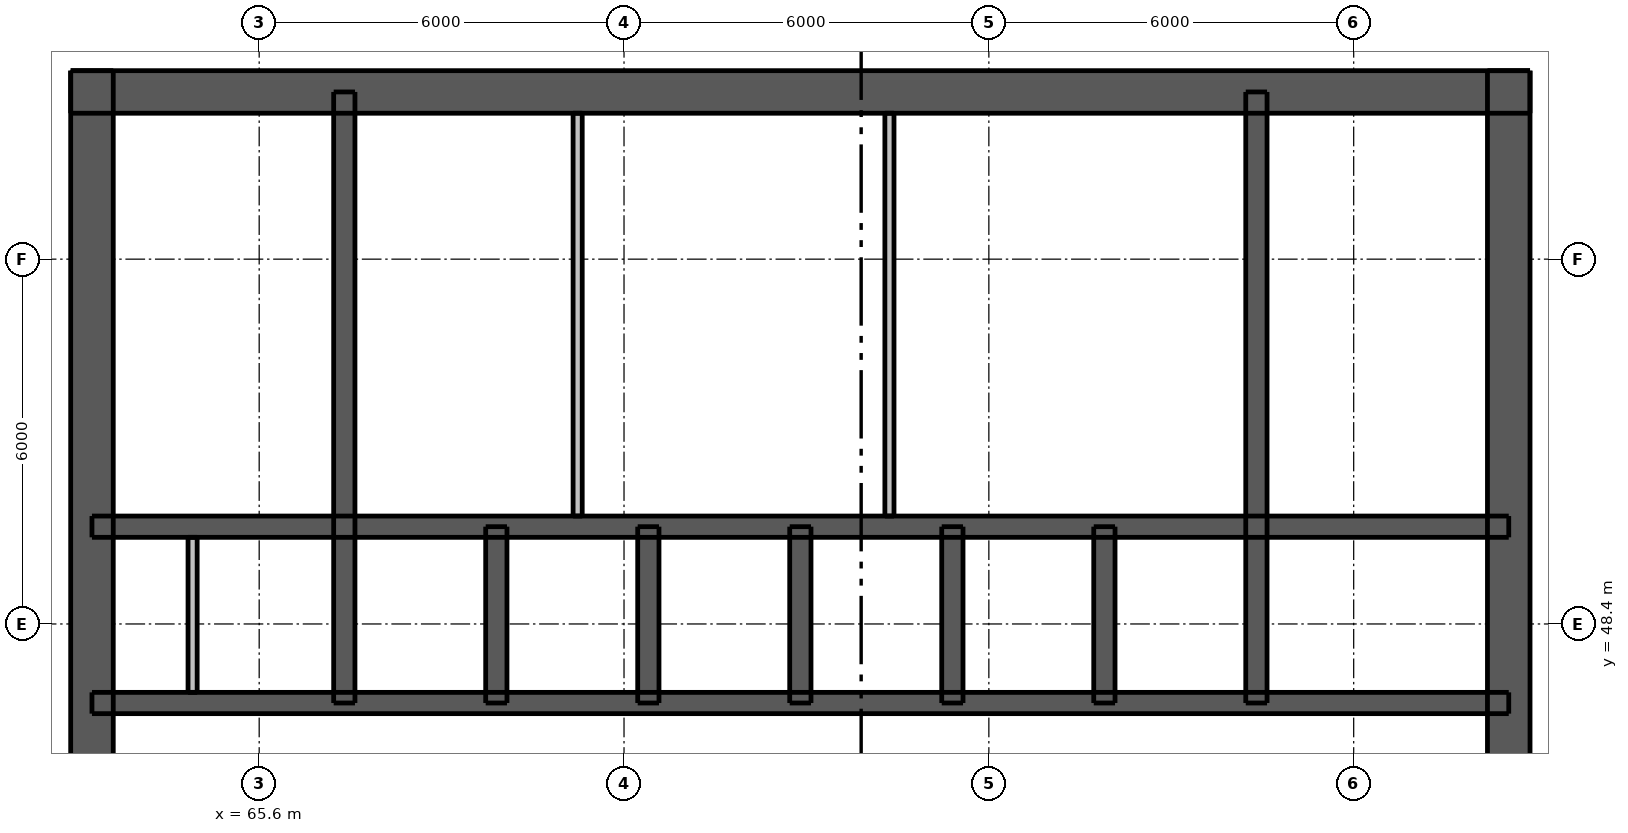
"""IFC4 building model, lengths in metres.
Left out: names, types, materials, properties, quantities, classifications, styles, units other than length and angle.
Written with IfcOpenShell. Run it as: python <this file> out.ifc"""

import sys

from ifc_helpers import new_model, si_unit, direction, frame, frame_2d, origin, place, context, subcontext, project, spatial, rectangle, extrude, element, fill, save


model = new_model("IFC4")
c1 = context("Model", 3, precision=1e-05, world=origin(), true_north=direction((0.0, 1.0)))
c2 = subcontext(c1, "Body", "Model", "MODEL_VIEW")
j1 = project(units=[si_unit("LENGTHUNIT", "METRE"), si_unit("PLANEANGLEUNIT", "RADIAN")], contexts=[c1])
p1 = place(None, origin())
s1 = spatial("IfcSite", under=j1, at=p1, CompositionType="ELEMENT")
p2 = place(p1, origin())
s2 = spatial("IfcBuilding", under=s1, at=p2, CompositionType="ELEMENT")
p3 = place(p2, frame((0.0, 0.0, 150.4)))
s3 = spatial("IfcBuildingStorey", under=s2, at=p3, CompositionType="ELEMENT", Elevation=150.4)
p4 = place(p3, frame((62.5, 57.15, 0.0), z_axis=(0.0, 0.0, 1.0), x_axis=(1.0, 0.0, 0.0)))
e1 = element("IfcWall", 1, at=p4, inside=s3, PredefinedType="SHEAR", context=c2, shape_type="SweptSolid", body=[
    extrude(rectangle(XDim=24.0, YDim=0.7, at=frame_2d((12.0, 0.0))), origin(), (0.0, 0.0, 1.0), 4.25),
])
p5 = place(p4, frame((20.938, 0.0, 0.0)))
e2 = element("IfcOpeningElement", 2, at=p5, cuts=e1, PredefinedType="OPENING", context=c2, shape_type="SweptSolid", body=[
    extrude(rectangle(XDim=1.1, YDim=2.1, at=frame_2d((0.55, 1.05))), frame((0.0, 0.36, 0.0), z_axis=(0.0, -1.0, 0.0), x_axis=(1.0, 0.0, 0.0)), (0.0, 0.0, 1.0), 0.72),
])
p6 = place(p4, frame((1.962, 0.0, 0.0)))
e3 = element("IfcOpeningElement", 3, at=p6, cuts=e1, PredefinedType="OPENING", context=c2, shape_type="SweptSolid", body=[
    extrude(rectangle(XDim=1.1, YDim=2.1, at=frame_2d((0.55, 1.05))), frame((0.0, 0.36, 0.0), z_axis=(0.0, -1.0, 0.0), x_axis=(1.0, 0.0, 0.0)), (0.0, 0.0, 1.0), 0.72),
])
p7 = place(p4, frame((6.056, 0.0, 0.0)))
e4 = element("IfcOpeningElement", 4, at=p7, cuts=e1, PredefinedType="OPENING", context=c2, shape_type="SweptSolid", body=[
    extrude(rectangle(XDim=0.9, YDim=2.1, at=frame_2d((0.45, 1.05))), frame((0.0, 0.36, 0.0), z_axis=(0.0, -1.0, 0.0), x_axis=(1.0, 0.0, 0.0)), (0.0, 0.0, 1.0), 0.72),
])
p8 = place(p4, frame((10.451, 0.0, 0.0)))
e5 = element("IfcOpeningElement", 5, at=p8, cuts=e1, PredefinedType="OPENING", context=c2, shape_type="SweptSolid", body=[
    extrude(rectangle(XDim=0.9, YDim=2.1, at=frame_2d((0.45, 1.05))), frame((0.0, 0.36, 0.0), z_axis=(0.0, -1.0, 0.0), x_axis=(1.0, 0.0, 0.0)), (0.0, 0.0, 1.0), 0.72),
])
p9 = place(p4, frame((15.945, 0.0, 0.0)))
e6 = element("IfcOpeningElement", 6, at=p9, cuts=e1, PredefinedType="OPENING", context=c2, shape_type="SweptSolid", body=[
    extrude(rectangle(XDim=0.9, YDim=2.1, at=frame_2d((0.45, 1.05))), frame((0.0, 0.36, 0.0), z_axis=(0.0, -1.0, 0.0), x_axis=(1.0, 0.0, 0.0)), (0.0, 0.0, 1.0), 0.72),
])
p10 = place(p3, frame((62.85, 33.5, 0.0), z_axis=(0.0, 0.0, 1.0), x_axis=(0.0, 1.0, 0.0)))
e7 = element("IfcWall", 7, at=p10, inside=s3, PredefinedType="SHEAR", context=c2, shape_type="SweptSolid", body=[
    extrude(rectangle(XDim=24.0, YDim=0.7, at=frame_2d((12.0, 0.0))), origin(), (0.0, 0.0, 1.0), 4.25),
])
p11 = place(p10, frame((11.2, 0.0, 0.0)))
e8 = element("IfcOpeningElement", 8, at=p11, cuts=e7, PredefinedType="OPENING", context=c2, shape_type="SweptSolid", body=[
    extrude(rectangle(XDim=1.6, YDim=2.1, at=frame_2d((0.8, 1.05))), frame((0.0, 0.36, 0.0), z_axis=(0.0, -1.0, 0.0), x_axis=(1.0, 0.0, 0.0)), (0.0, 0.0, 1.0), 0.72),
])
p12 = place(p3, frame((86.15, 33.5, 0.0), z_axis=(0.0, 0.0, 1.0), x_axis=(0.0, 1.0, 0.0)))
e9 = element("IfcWall", 9, at=p12, inside=s3, PredefinedType="SHEAR", context=c2, shape_type="SweptSolid", body=[
    extrude(rectangle(XDim=24.0, YDim=0.7, at=frame_2d((12.0, 0.0))), origin(), (0.0, 0.0, 1.0), 4.25),
])
p13 = place(p12, frame((11.2, 0.0, 0.0)))
e10 = element("IfcOpeningElement", 10, at=p13, cuts=e9, PredefinedType="OPENING", context=c2, shape_type="SweptSolid", body=[
    extrude(rectangle(XDim=1.6, YDim=2.1, at=frame_2d((0.8, 1.05))), frame((0.0, 0.36, 0.0), z_axis=(0.0, -1.0, 0.0), x_axis=(1.0, 0.0, 0.0)), (0.0, 0.0, 1.0), 0.72),
])
p14 = place(p3, frame((62.85, 47.1, 0.0), z_axis=(0.0, 0.0, 1.0), x_axis=(1.0, 0.0, 0.0)))
e11 = element("IfcWall", 11, at=p14, inside=s3, PredefinedType="SHEAR", context=c2, shape_type="SweptSolid", body=[
    extrude(rectangle(XDim=23.3, YDim=0.35, at=frame_2d((11.65, 0.0))), origin(), (0.0, 0.0, 1.0), 4.25),
])
p15 = place(p14, frame((0.603, 0.0, 0.0)))
e12 = element("IfcOpeningElement", 12, at=p15, cuts=e11, PredefinedType="OPENING", context=c2, shape_type="SweptSolid", body=[
    extrude(rectangle(XDim=0.8, YDim=2.1, at=frame_2d((0.4, 1.05))), frame((0.0, 0.185, 0.0), z_axis=(0.0, -1.0, 0.0), x_axis=(1.0, 0.0, 0.0)), (0.0, 0.0, 1.0), 0.37),
])
p16 = place(p14, frame((2.365, 0.0, 0.0)))
e13 = element("IfcOpeningElement", 13, at=p16, cuts=e11, PredefinedType="OPENING", context=c2, shape_type="SweptSolid", body=[
    extrude(rectangle(XDim=0.9, YDim=2.1, at=frame_2d((0.45, 1.05))), frame((0.0, 0.185, 0.0), z_axis=(0.0, -1.0, 0.0), x_axis=(1.0, 0.0, 0.0)), (0.0, 0.0, 1.0), 0.37),
])
p17 = place(p14, frame((20.688, 0.0, 0.0)))
e14 = element("IfcOpeningElement", 14, at=p17, cuts=e11, PredefinedType="OPENING", context=c2, shape_type="SweptSolid", body=[
    extrude(rectangle(XDim=0.9, YDim=2.1, at=frame_2d((0.45, 1.05))), frame((0.0, 0.185, 0.0), z_axis=(0.0, -1.0, 0.0), x_axis=(1.0, 0.0, 0.0)), (0.0, 0.0, 1.0), 0.37),
])
p18 = place(p14, frame((4.85, 0.0, 0.0)))
e15 = element("IfcOpeningElement", 15, at=p18, cuts=e11, PredefinedType="OPENING", context=c2, shape_type="SweptSolid", body=[
    extrude(rectangle(XDim=1.1, YDim=2.1, at=frame_2d((0.55, 1.05))), frame((0.0, 0.185, 0.0), z_axis=(0.0, -1.0, 0.0), x_axis=(1.0, 0.0, 0.0)), (0.0, 0.0, 1.0), 0.37),
])
p19 = place(p14, frame((7.35, 0.0, 0.0)))
e16 = element("IfcOpeningElement", 16, at=p19, cuts=e11, PredefinedType="OPENING", context=c2, shape_type="SweptSolid", body=[
    extrude(rectangle(XDim=1.1, YDim=2.1, at=frame_2d((0.55, 1.05))), frame((0.0, 0.185, 0.0), z_axis=(0.0, -1.0, 0.0), x_axis=(1.0, 0.0, 0.0)), (0.0, 0.0, 1.0), 0.37),
])
p20 = place(p14, frame((9.85, 0.0, 0.0)))
e17 = element("IfcOpeningElement", 17, at=p20, cuts=e11, PredefinedType="OPENING", context=c2, shape_type="SweptSolid", body=[
    extrude(rectangle(XDim=1.1, YDim=2.1, at=frame_2d((0.55, 1.05))), frame((0.0, 0.185, 0.0), z_axis=(0.0, -1.0, 0.0), x_axis=(1.0, 0.0, 0.0)), (0.0, 0.0, 1.0), 0.37),
])
p21 = place(p14, frame((12.35, 0.0, 0.0)))
e18 = element("IfcOpeningElement", 18, at=p21, cuts=e11, PredefinedType="OPENING", context=c2, shape_type="SweptSolid", body=[
    extrude(rectangle(XDim=1.1, YDim=2.1, at=frame_2d((0.55, 1.05))), frame((0.0, 0.185, 0.0), z_axis=(0.0, -1.0, 0.0), x_axis=(1.0, 0.0, 0.0)), (0.0, 0.0, 1.0), 0.37),
])
p22 = place(p14, frame((14.85, 0.0, 0.0)))
e19 = element("IfcOpeningElement", 19, at=p22, cuts=e11, PredefinedType="OPENING", context=c2, shape_type="SweptSolid", body=[
    extrude(rectangle(XDim=1.1, YDim=2.1, at=frame_2d((0.55, 1.05))), frame((0.0, 0.185, 0.0), z_axis=(0.0, -1.0, 0.0), x_axis=(1.0, 0.0, 0.0)), (0.0, 0.0, 1.0), 0.37),
])
p23 = place(p14, frame((17.35, 0.0, 0.0)))
e20 = element("IfcOpeningElement", 20, at=p23, cuts=e11, PredefinedType="OPENING", context=c2, shape_type="SweptSolid", body=[
    extrude(rectangle(XDim=1.1, YDim=2.1, at=frame_2d((0.55, 1.05))), frame((0.0, 0.185, 0.0), z_axis=(0.0, -1.0, 0.0), x_axis=(1.0, 0.0, 0.0)), (0.0, 0.0, 1.0), 0.37),
])
p24 = place(p3, frame((62.85, 50.0, 0.0), z_axis=(0.0, 0.0, 1.0), x_axis=(1.0, 0.0, 0.0)))
e21 = element("IfcWall", 21, at=p24, inside=s3, PredefinedType="SHEAR", context=c2, shape_type="SweptSolid", body=[
    extrude(rectangle(XDim=23.3, YDim=0.35, at=frame_2d((11.65, 0.0))), origin(), (0.0, 0.0, 1.0), 4.25),
])
for number, where, z_axis, x_axis in (
    (22, (67.0, 47.1, 0.0), (0.0, 0.0, 1.0), (0.0, 1.0, 0.0)),
    (23, (82.0, 47.1, 0.0), (0.0, 0.0, 1.0), (0.0, 1.0, 0.0)),
):
    element("IfcWall", number, at=place(p3, frame(where, z_axis=z_axis, x_axis=x_axis)), inside=s3, PredefinedType="SHEAR", context=c2, shape_type="SweptSolid", body=[
        extrude(rectangle(XDim=10.05, YDim=0.35, at=frame_2d((5.025, 0.0))), origin(), (0.0, 0.0, 1.0), 4.25),
    ])
for number, where, z_axis, x_axis in (
    (24, (69.5, 47.1, 0.0), (0.0, 0.0, 1.0), (0.0, 1.0, 0.0)),
    (25, (72.0, 47.1, 0.0), (0.0, 0.0, 1.0), (0.0, 1.0, 0.0)),
    (26, (74.5, 47.1, 0.0), (0.0, 0.0, 1.0), (0.0, 1.0, 0.0)),
    (27, (77.0, 47.1, 0.0), (0.0, 0.0, 1.0), (0.0, 1.0, 0.0)),
    (28, (79.5, 47.1, 0.0), (0.0, 0.0, 1.0), (0.0, 1.0, 0.0)),
):
    element("IfcWall", number, at=place(p3, frame(where, z_axis=z_axis, x_axis=x_axis)), inside=s3, PredefinedType="SHEAR", context=c2, shape_type="SweptSolid", body=[
        extrude(rectangle(XDim=2.9, YDim=0.35, at=frame_2d((1.45, 0.0))), origin(), (0.0, 0.0, 1.0), 4.25),
    ])
p25 = place(p3, frame((64.505, 47.275, 0.0), z_axis=(0.0, 0.0, 1.0), x_axis=(0.0, 1.0, 0.0)))
e29 = element("IfcWall", 29, at=p25, inside=s3, PredefinedType="PLUMBINGWALL", context=c2, shape_type="SweptSolid", body=[
    extrude(rectangle(XDim=2.55, YDim=0.15, at=frame_2d((1.275, 0.0))), origin(), (0.0, 0.0, 1.0), 4.25),
])
for number, where, z_axis, x_axis in (
    (30, (70.837, 50.175, 0.0), (0.0, 0.0, 1.0), (0.0, 1.0, 0.0)),
    (31, (75.965, 50.175, 0.0), (0.0, 0.0, 1.0), (0.0, 1.0, 0.0)),
):
    element("IfcWall", number, at=place(p3, frame(where, z_axis=z_axis, x_axis=x_axis)), inside=s3, PredefinedType="PLUMBINGWALL", context=c2, shape_type="SweptSolid", body=[
        extrude(rectangle(XDim=6.625, YDim=0.15, at=frame_2d((3.312, 0.0))), origin(), (0.0, 0.0, 1.0), 4.25),
    ])
p26 = place(p5, origin())
e32 = element("IfcDoor", 32, at=p26, inside=s3, OperationType="SINGLE_SWING_RIGHT", PredefinedType="DOOR", context=c2, shape_type="SweptSolid", body=[
    extrude(rectangle(XDim=1.1, YDim=2.1, at=frame_2d((0.55, 1.05))), frame((0.0, -0.288, 0.0), z_axis=(0.0, -1.0, 0.0), x_axis=(1.0, 0.0, 0.0)), (0.0, 0.0, 1.0), 0.05),
])
fill(e2, e32)
p27 = place(p6, origin())
e33 = element("IfcDoor", 33, at=p27, inside=s3, OperationType="SINGLE_SWING_LEFT", PredefinedType="DOOR", context=c2, shape_type="SweptSolid", body=[
    extrude(rectangle(XDim=1.1, YDim=2.1, at=frame_2d((0.55, 1.05))), frame((0.0, -0.288, 0.0), z_axis=(0.0, -1.0, 0.0), x_axis=(1.0, 0.0, 0.0)), (0.0, 0.0, 1.0), 0.05),
])
fill(e3, e33)
p28 = place(p11, origin())
e34 = element("IfcDoor", 34, at=p28, inside=s3, OperationType="DOUBLE_DOOR_SINGLE_SWING", PredefinedType="DOOR", context=c2, shape_type="SweptSolid", body=[
    extrude(rectangle(XDim=1.6, YDim=2.1, at=frame_2d((0.8, 1.05))), frame((0.0, -0.288, 0.0), z_axis=(0.0, -1.0, 0.0), x_axis=(1.0, 0.0, 0.0)), (0.0, 0.0, 1.0), 0.05),
])
fill(e8, e34)
p29 = place(p13, origin())
e35 = element("IfcDoor", 35, at=p29, inside=s3, OperationType="DOUBLE_DOOR_SINGLE_SWING", PredefinedType="DOOR", context=c2, shape_type="SweptSolid", body=[
    extrude(rectangle(XDim=1.6, YDim=2.1, at=frame_2d((0.8, 1.05))), frame((0.0, 0.337, 0.0), z_axis=(0.0, -1.0, 0.0), x_axis=(1.0, 0.0, 0.0)), (0.0, 0.0, 1.0), 0.05),
])
fill(e10, e35)
p30 = place(p15, origin())
e36 = element("IfcDoor", 36, at=p30, inside=s3, OperationType="SINGLE_SWING_LEFT", PredefinedType="DOOR", context=c2, shape_type="SweptSolid", body=[
    extrude(rectangle(XDim=0.8, YDim=2.1, at=frame_2d((0.4, 1.05))), frame((0.0, 0.163, 0.0), z_axis=(0.0, -1.0, 0.0), x_axis=(1.0, 0.0, 0.0)), (0.0, 0.0, 1.0), 0.05),
])
fill(e12, e36)
p31 = place(p16, origin())
e37 = element("IfcDoor", 37, at=p31, inside=s3, OperationType="SINGLE_SWING_RIGHT", PredefinedType="DOOR", context=c2, shape_type="SweptSolid", body=[
    extrude(rectangle(XDim=0.9, YDim=2.1, at=frame_2d((0.45, 1.05))), frame((0.0, 0.163, 0.0), z_axis=(0.0, -1.0, 0.0), x_axis=(1.0, 0.0, 0.0)), (0.0, 0.0, 1.0), 0.05),
])
fill(e13, e37)
p32 = place(p17, origin())
e38 = element("IfcDoor", 38, at=p32, inside=s3, OperationType="SINGLE_SWING_LEFT", PredefinedType="DOOR", context=c2, shape_type="SweptSolid", body=[
    extrude(rectangle(XDim=0.9, YDim=2.1, at=frame_2d((0.45, 1.05))), frame((0.0, 0.163, 0.0), z_axis=(0.0, -1.0, 0.0), x_axis=(1.0, 0.0, 0.0)), (0.0, 0.0, 1.0), 0.05),
])
fill(e14, e38)
p33 = place(p7, origin())
e39 = element("IfcDoor", 39, at=p33, inside=s3, OperationType="SINGLE_SWING_RIGHT", PredefinedType="DOOR", context=c2, shape_type="SweptSolid", body=[
    extrude(rectangle(XDim=0.9, YDim=2.1, at=frame_2d((0.45, 1.05))), frame((0.0, -0.288, 0.0), z_axis=(0.0, -1.0, 0.0), x_axis=(1.0, 0.0, 0.0)), (0.0, 0.0, 1.0), 0.05),
])
fill(e4, e39)
p34 = place(p8, origin())
e40 = element("IfcDoor", 40, at=p34, inside=s3, OperationType="SINGLE_SWING_RIGHT", PredefinedType="DOOR", context=c2, shape_type="SweptSolid", body=[
    extrude(rectangle(XDim=0.9, YDim=2.1, at=frame_2d((0.45, 1.05))), frame((0.0, -0.288, 0.0), z_axis=(0.0, -1.0, 0.0), x_axis=(1.0, 0.0, 0.0)), (0.0, 0.0, 1.0), 0.05),
])
fill(e5, e40)
p35 = place(p9, origin())
e41 = element("IfcDoor", 41, at=p35, inside=s3, OperationType="SINGLE_SWING_RIGHT", PredefinedType="DOOR", context=c2, shape_type="SweptSolid", body=[
    extrude(rectangle(XDim=0.9, YDim=2.1, at=frame_2d((0.45, 1.05))), frame((0.0, -0.288, 0.0), z_axis=(0.0, -1.0, 0.0), x_axis=(1.0, 0.0, 0.0)), (0.0, 0.0, 1.0), 0.05),
])
fill(e6, e41)
p36 = place(p18, origin())
e42 = element("IfcDoor", 42, at=p36, inside=s3, OperationType="DOUBLE_DOOR_SLIDING", PredefinedType="DOOR", context=c2, shape_type="SweptSolid", body=[
    extrude(rectangle(XDim=1.1, YDim=2.1, at=frame_2d((0.55, 1.05))), frame((0.0, 0.025, 0.0), z_axis=(0.0, -1.0, 0.0), x_axis=(1.0, 0.0, 0.0)), (0.0, 0.0, 1.0), 0.05),
])
fill(e15, e42)
p37 = place(p19, origin())
e43 = element("IfcDoor", 43, at=p37, inside=s3, OperationType="DOUBLE_DOOR_SLIDING", PredefinedType="DOOR", context=c2, shape_type="SweptSolid", body=[
    extrude(rectangle(XDim=1.1, YDim=2.1, at=frame_2d((0.55, 1.05))), frame((0.0, 0.025, 0.0), z_axis=(0.0, -1.0, 0.0), x_axis=(1.0, 0.0, 0.0)), (0.0, 0.0, 1.0), 0.05),
])
fill(e16, e43)
p38 = place(p20, origin())
e44 = element("IfcDoor", 44, at=p38, inside=s3, OperationType="DOUBLE_DOOR_SLIDING", PredefinedType="DOOR", context=c2, shape_type="SweptSolid", body=[
    extrude(rectangle(XDim=1.1, YDim=2.1, at=frame_2d((0.55, 1.05))), frame((0.0, 0.025, 0.0), z_axis=(0.0, -1.0, 0.0), x_axis=(1.0, 0.0, 0.0)), (0.0, 0.0, 1.0), 0.05),
])
fill(e17, e44)
p39 = place(p21, origin())
e45 = element("IfcDoor", 45, at=p39, inside=s3, OperationType="DOUBLE_DOOR_SLIDING", PredefinedType="DOOR", context=c2, shape_type="SweptSolid", body=[
    extrude(rectangle(XDim=1.1, YDim=2.1, at=frame_2d((0.55, 1.05))), frame((0.0, 0.025, 0.0), z_axis=(0.0, -1.0, 0.0), x_axis=(1.0, 0.0, 0.0)), (0.0, 0.0, 1.0), 0.05),
])
fill(e18, e45)
p40 = place(p22, origin())
e46 = element("IfcDoor", 46, at=p40, inside=s3, OperationType="DOUBLE_DOOR_SLIDING", PredefinedType="DOOR", context=c2, shape_type="SweptSolid", body=[
    extrude(rectangle(XDim=1.1, YDim=2.1, at=frame_2d((0.55, 1.05))), frame((0.0, 0.025, 0.0), z_axis=(0.0, -1.0, 0.0), x_axis=(1.0, 0.0, 0.0)), (0.0, 0.0, 1.0), 0.05),
])
fill(e19, e46)
p41 = place(p23, origin())
e47 = element("IfcDoor", 47, at=p41, inside=s3, OperationType="DOUBLE_DOOR_SLIDING", PredefinedType="DOOR", context=c2, shape_type="SweptSolid", body=[
    extrude(rectangle(XDim=1.1, YDim=2.1, at=frame_2d((0.55, 1.05))), frame((0.0, 0.025, 0.0), z_axis=(0.0, -1.0, 0.0), x_axis=(1.0, 0.0, 0.0)), (0.0, 0.0, 1.0), 0.05),
])
fill(e20, e47)
save(model, sys.argv[1])
